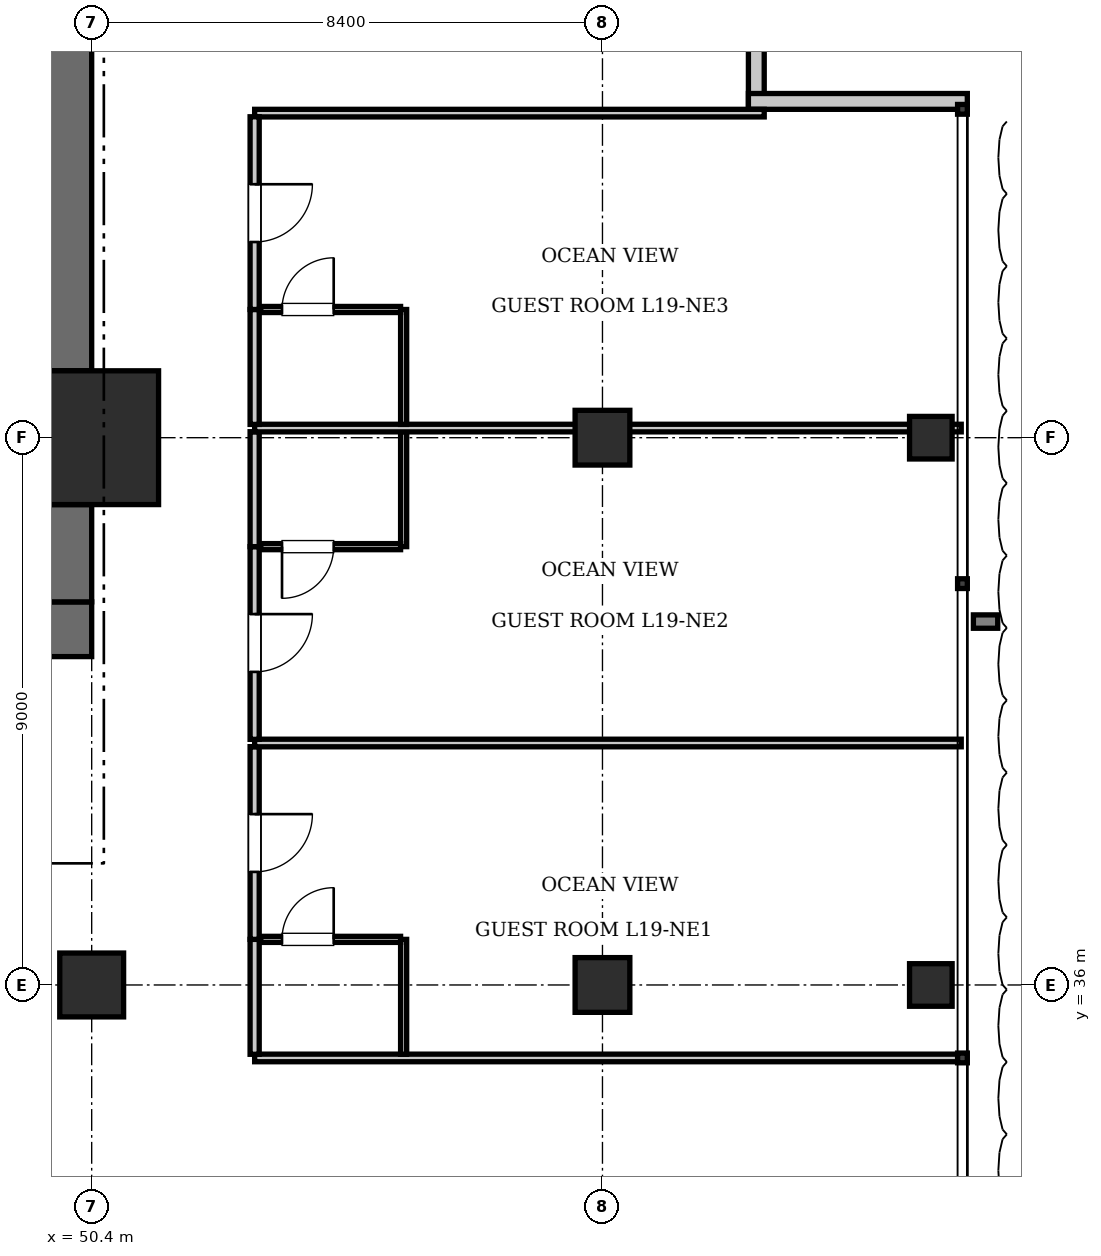
"""IFC4 building model, lengths in metres.
Left out: names, types, materials, properties, quantities, classifications, styles, units other than length and angle.
Written with IfcOpenShell. Run it as: python <this file> out.ifc"""

import sys

from ifc_helpers import new_model, si_unit, direction, frame, frame_2d, origin, origin_2d, place, context, subcontext, project, spatial, rectangle, i_section, extrude, element, fill, save


model = new_model("IFC4")
c1 = context("Model", 3, precision=1e-05, world=origin(), true_north=direction((0.0, 1.0)))
c2 = subcontext(c1, "Body", "Model", "MODEL_VIEW")
j1 = project(units=[si_unit("LENGTHUNIT", "METRE"), si_unit("PLANEANGLEUNIT", "RADIAN")], contexts=[c1])
p1 = place(None, origin())
s1 = spatial("IfcSite", under=j1, at=p1, CompositionType="ELEMENT")
p2 = place(p1, origin())
s2 = spatial("IfcBuilding", under=s1, at=p2, CompositionType="ELEMENT")
p3 = place(p2, frame((0.0, 0.0, 80.85)))
s3 = spatial("IfcBuildingStorey", under=s2, at=p3, CompositionType="ELEMENT", Elevation=80.85)
p4 = place(p3, frame((50.4, 45.0, 0.0), z_axis=(0.0, 0.0, 1.0), x_axis=(1.0, 0.0, 0.0)))
e1 = element("IfcColumn", 1, at=p4, inside=s3, PredefinedType="COLUMN", context=c2, shape_type="SweptSolid", body=[
    extrude(rectangle(XDim=2.2, YDim=2.2, at=origin_2d()), origin(), (0.0, 0.0, 1.0), 3.85),
])
p5 = place(p3, frame((43.6, 41.85, 0.0), z_axis=(0.0, 0.0, 1.0), x_axis=(1.0, 0.0, 0.0)))
e2 = element("IfcWall", 2, at=p5, inside=s3, PredefinedType="SHEAR", context=c2, shape_type="SweptSolid", body=[
    extrude(rectangle(XDim=6.8, YDim=0.9, at=frame_2d((3.4, 0.0))), origin(), (0.0, 0.0, 1.0), 3.85),
])
p6 = place(p5, frame((3.9, 0.0, 0.0)))
e3 = element("IfcOpeningElement", 3, at=p6, cuts=e2, PredefinedType="OPENING", context=c2, shape_type="SweptSolid", body=[
    extrude(rectangle(XDim=1.15, YDim=2.15, at=frame_2d((0.575, 1.075))), frame((0.0, 0.46, 0.0), z_axis=(0.0, -1.0, 0.0), x_axis=(1.0, 0.0, 0.0)), (0.0, 0.0, 1.0), 0.92),
])
p7 = place(p5, frame((0.55, 0.0, 0.0)))
e4 = element("IfcOpeningElement", 4, at=p7, cuts=e2, PredefinedType="OPENING", context=c2, shape_type="SweptSolid", body=[
    extrude(rectangle(XDim=1.1, YDim=2.2, at=frame_2d((0.55, 1.1))), frame((0.0, 0.46, 0.0), z_axis=(0.0, -1.0, 0.0), x_axis=(1.0, 0.0, 0.0)), (0.0, 0.0, 1.0), 0.92),
])
p8 = place(p3, frame((49.95, 42.3, 0.0), z_axis=(0.0, 0.0, 1.0), x_axis=(0.0, 1.0, 0.0)))
e5 = element("IfcWall", 5, at=p8, inside=s3, PredefinedType="SHEAR", context=c2, shape_type="SweptSolid", body=[
    extrude(rectangle(XDim=1.6, YDim=0.9, at=frame_2d((0.8, 0.0))), origin(), (0.0, 0.0, 1.0), 3.85),
])
p9 = place(p3, frame((49.95, 46.1, 0.0), z_axis=(0.0, 0.0, 1.0), x_axis=(0.0, 1.0, 0.0)))
e6 = element("IfcWall", 6, at=p9, inside=s3, PredefinedType="SHEAR", context=c2, shape_type="SweptSolid", body=[
    extrude(rectangle(XDim=7.0, YDim=0.9, at=frame_2d((3.5, 0.0))), origin(), (0.0, 0.0, 1.0), 3.85),
])
p10 = place(p3, frame((50.4, 36.0, 0.0), z_axis=(0.0, 0.0, 1.0), x_axis=(1.0, 0.0, 0.0)))
e7 = element("IfcColumn", 7, at=p10, inside=s3, PredefinedType="COLUMN", context=c2, shape_type="SweptSolid", body=[
    extrude(rectangle(XDim=1.05, YDim=1.05, at=origin_2d()), origin(), (0.0, 0.0, 1.0), 3.85),
])
for number, where, z_axis, x_axis in (
    (8, (58.8, 36.0, 0.0), (0.0, 0.0, 1.0), (1.0, 0.0, 0.0)),
    (9, (58.8, 45.0, 0.0), (0.0, 0.0, 1.0), (1.0, 0.0, 0.0)),
):
    element("IfcColumn", number, at=place(p3, frame(where, z_axis=z_axis, x_axis=x_axis)), inside=s3, PredefinedType="COLUMN", context=c2, shape_type="SweptSolid", body=[
        extrude(rectangle(XDim=0.9, YDim=0.9, at=origin_2d()), origin(), (0.0, 0.0, 1.0), 3.85),
    ])
for number, where, z_axis, x_axis in (
    (10, (64.2, 36.0, 0.0), (0.0, 0.0, 1.0), (1.0, 0.0, 0.0)),
    (11, (64.2, 45.0, 0.0), (0.0, 0.0, 1.0), (1.0, 0.0, 0.0)),
):
    element("IfcColumn", number, at=place(p3, frame(where, z_axis=z_axis, x_axis=x_axis)), inside=s3, PredefinedType="COLUMN", context=c2, shape_type="SweptSolid", body=[
        extrude(i_section(OverallWidth=0.7, OverallDepth=0.7, WebThickness=0.028, FlangeThickness=0.044, at=origin_2d()), origin(), (0.0, 0.0, 1.0), 3.85),
    ])
for number, where, z_axis, x_axis in (
    (12, (61.33, 54.0, 0.0), (0.0, 0.0, 1.0), (0.0, -1.0, 0.0)),
    (13, (61.2, 50.53, 0.0), (0.0, 0.0, 1.0), (1.0, 0.0, 0.0)),
):
    element("IfcWall", number, at=place(p3, frame(where, z_axis=z_axis, x_axis=x_axis)), inside=s3, PredefinedType="SOLIDWALL", context=c2, shape_type="SweptSolid", body=[
        extrude(rectangle(XDim=3.6, YDim=0.26, at=frame_2d((1.8, 0.0))), origin(), (0.0, 0.0, 1.0), 3.61),
    ])
p11 = place(p3, frame((53.08, 34.8, 0.0), z_axis=(0.0, 0.0, 1.0), x_axis=(1.0, 0.0, 0.0)))
e14 = element("IfcWall", 14, at=p11, inside=s3, PredefinedType="PARTITIONING", context=c2, shape_type="SweptSolid", body=[
    extrude(rectangle(XDim=11.62, YDim=0.125, at=frame_2d((5.81, 0.0))), origin(), (0.0, 0.0, 1.0), 3.61),
])
p12 = place(p3, frame((53.08, 50.337, 0.0), z_axis=(0.0, 0.0, 1.0), x_axis=(1.0, 0.0, 0.0)))
e15 = element("IfcWall", 15, at=p12, inside=s3, PredefinedType="PARTITIONING", context=c2, shape_type="SweptSolid", body=[
    extrude(rectangle(XDim=8.38, YDim=0.125, at=frame_2d((4.19, 0.0))), origin(), (0.0, 0.0, 1.0), 3.61),
])
p13 = place(p3, frame((53.08, 34.86, 0.0), z_axis=(0.0, 0.0, 1.0), x_axis=(0.0, 1.0, 0.0)))
e16 = element("IfcWall", 16, at=p13, inside=s3, PredefinedType="PARTITIONING", context=c2, shape_type="SweptSolid", body=[
    extrude(rectangle(XDim=1.89, YDim=0.15, at=frame_2d((0.945, 0.0))), origin(), (0.0, 0.0, 1.0), 3.61),
])
p14 = place(p3, frame((53.08, 36.75, 0.0), z_axis=(0.0, 0.0, 1.0), x_axis=(0.0, 1.0, 0.0)))
e17 = element("IfcWall", 17, at=p14, inside=s3, PredefinedType="PARTITIONING", context=c2, shape_type="SweptSolid", body=[
    extrude(rectangle(XDim=3.169, YDim=0.15, at=frame_2d((1.584, 0.0))), origin(), (0.0, 0.0, 1.0), 3.61),
])
p15 = place(p14, frame((1.11, 0.0, 0.0)))
e18 = element("IfcOpeningElement", 18, at=p15, cuts=e17, PredefinedType="OPENING", context=c2, shape_type="SweptSolid", body=[
    extrude(rectangle(XDim=0.95, YDim=2.15, at=frame_2d((0.475, 1.075))), frame((0.0, 0.085, 0.0), z_axis=(0.0, -1.0, 0.0), x_axis=(1.0, 0.0, 0.0)), (0.0, 0.0, 1.0), 0.17),
])
p16 = place(p3, frame((55.53, 34.86, 0.0), z_axis=(0.0, 0.0, 1.0), x_axis=(0.0, 1.0, 0.0)))
e19 = element("IfcWall", 19, at=p16, inside=s3, PredefinedType="PARTITIONING", context=c2, shape_type="SweptSolid", body=[
    extrude(rectangle(XDim=1.89, YDim=0.1, at=frame_2d((0.945, 0.0))), origin(), (0.0, 0.0, 1.0), 3.61),
])
p17 = place(p3, frame((53.18, 36.75, 0.0), z_axis=(0.0, 0.0, 1.0), x_axis=(1.0, 0.0, 0.0)))
e20 = element("IfcWall", 20, at=p17, inside=s3, PredefinedType="PARTITIONING", context=c2, shape_type="SweptSolid", body=[
    extrude(rectangle(XDim=2.3, YDim=0.1, at=frame_2d((1.15, 0.0))), origin(), (0.0, 0.0, 1.0), 3.61),
])
p18 = place(p17, frame((0.35, 0.0, 0.0)))
e21 = element("IfcOpeningElement", 21, at=p18, cuts=e20, PredefinedType="OPENING", context=c2, shape_type="SweptSolid", body=[
    extrude(rectangle(XDim=0.85, YDim=2.1, at=frame_2d((0.425, 1.05))), frame((0.0, 0.06, 0.0), z_axis=(0.0, -1.0, 0.0), x_axis=(1.0, 0.0, 0.0)), (0.0, 0.0, 1.0), 0.12),
])
p19 = place(p3, frame((53.08, 39.979, 0.0), z_axis=(0.0, 0.0, 1.0), x_axis=(1.0, 0.0, 0.0)))
e22 = element("IfcWall", 22, at=p19, inside=s3, PredefinedType="PARTITIONING", context=c2, shape_type="SweptSolid", body=[
    extrude(rectangle(XDim=11.62, YDim=0.125, at=frame_2d((5.81, 0.0))), origin(), (0.0, 0.0, 1.0), 3.61),
])
p20 = place(p3, frame((53.08, 40.039, 0.0), z_axis=(0.0, 0.0, 1.0), x_axis=(0.0, 1.0, 0.0)))
e23 = element("IfcWall", 23, at=p20, inside=s3, PredefinedType="PARTITIONING", context=c2, shape_type="SweptSolid", body=[
    extrude(rectangle(XDim=3.169, YDim=0.15, at=frame_2d((1.584, 0.0))), origin(), (0.0, 0.0, 1.0), 3.61),
])
p21 = place(p20, frame((1.11, 0.0, 0.0)))
e24 = element("IfcOpeningElement", 24, at=p21, cuts=e23, PredefinedType="OPENING", context=c2, shape_type="SweptSolid", body=[
    extrude(rectangle(XDim=0.95, YDim=2.15, at=frame_2d((0.475, 1.075))), frame((0.0, 0.085, 0.0), z_axis=(0.0, -1.0, 0.0), x_axis=(1.0, 0.0, 0.0)), (0.0, 0.0, 1.0), 0.17),
])
p22 = place(p3, frame((53.08, 43.208, 0.0), z_axis=(0.0, 0.0, 1.0), x_axis=(0.0, 1.0, 0.0)))
e25 = element("IfcWall", 25, at=p22, inside=s3, PredefinedType="PARTITIONING", context=c2, shape_type="SweptSolid", body=[
    extrude(rectangle(XDim=1.89, YDim=0.15, at=frame_2d((0.945, 0.0))), origin(), (0.0, 0.0, 1.0), 3.61),
])
p23 = place(p3, frame((55.53, 43.208, 0.0), z_axis=(0.0, 0.0, 1.0), x_axis=(0.0, 1.0, 0.0)))
e26 = element("IfcWall", 26, at=p23, inside=s3, PredefinedType="PARTITIONING", context=c2, shape_type="SweptSolid", body=[
    extrude(rectangle(XDim=1.89, YDim=0.1, at=frame_2d((0.945, 0.0))), origin(), (0.0, 0.0, 1.0), 3.61),
])
p24 = place(p3, frame((53.18, 43.208, 0.0), z_axis=(0.0, 0.0, 1.0), x_axis=(1.0, 0.0, 0.0)))
e27 = element("IfcWall", 27, at=p24, inside=s3, PredefinedType="PARTITIONING", context=c2, shape_type="SweptSolid", body=[
    extrude(rectangle(XDim=2.3, YDim=0.1, at=frame_2d((1.15, 0.0))), origin(), (0.0, 0.0, 1.0), 3.61),
])
p25 = place(p24, frame((0.35, 0.0, 0.0)))
e28 = element("IfcOpeningElement", 28, at=p25, cuts=e27, PredefinedType="OPENING", context=c2, shape_type="SweptSolid", body=[
    extrude(rectangle(XDim=0.85, YDim=2.1, at=frame_2d((0.425, 1.05))), frame((0.0, 0.06, 0.0), z_axis=(0.0, -1.0, 0.0), x_axis=(1.0, 0.0, 0.0)), (0.0, 0.0, 1.0), 0.12),
])
p26 = place(p3, frame((53.08, 45.158, 0.0), z_axis=(0.0, 0.0, 1.0), x_axis=(1.0, 0.0, 0.0)))
e29 = element("IfcWall", 29, at=p26, inside=s3, PredefinedType="PARTITIONING", context=c2, shape_type="SweptSolid", body=[
    extrude(rectangle(XDim=11.62, YDim=0.125, at=frame_2d((5.81, 0.0))), origin(), (0.0, 0.0, 1.0), 2.999),
])
p27 = place(p3, frame((53.08, 45.218, 0.0), z_axis=(0.0, 0.0, 1.0), x_axis=(0.0, 1.0, 0.0)))
e30 = element("IfcWall", 30, at=p27, inside=s3, PredefinedType="PARTITIONING", context=c2, shape_type="SweptSolid", body=[
    extrude(rectangle(XDim=1.89, YDim=0.15, at=frame_2d((0.945, 0.0))), origin(), (0.0, 0.0, 1.0), 3.61),
])
p28 = place(p3, frame((53.08, 47.108, 0.0), z_axis=(0.0, 0.0, 1.0), x_axis=(0.0, 1.0, 0.0)))
e31 = element("IfcWall", 31, at=p28, inside=s3, PredefinedType="PARTITIONING", context=c2, shape_type="SweptSolid", body=[
    extrude(rectangle(XDim=3.169, YDim=0.15, at=frame_2d((1.584, 0.0))), origin(), (0.0, 0.0, 1.0), 3.61),
])
p29 = place(p28, frame((1.11, 0.0, 0.0)))
e32 = element("IfcOpeningElement", 32, at=p29, cuts=e31, PredefinedType="OPENING", context=c2, shape_type="SweptSolid", body=[
    extrude(rectangle(XDim=0.95, YDim=2.15, at=frame_2d((0.475, 1.075))), frame((0.0, 0.085, 0.0), z_axis=(0.0, -1.0, 0.0), x_axis=(1.0, 0.0, 0.0)), (0.0, 0.0, 1.0), 0.17),
])
p30 = place(p3, frame((55.53, 45.218, 0.0), z_axis=(0.0, 0.0, 1.0), x_axis=(0.0, 1.0, 0.0)))
e33 = element("IfcWall", 33, at=p30, inside=s3, PredefinedType="PARTITIONING", context=c2, shape_type="SweptSolid", body=[
    extrude(rectangle(XDim=1.89, YDim=0.1, at=frame_2d((0.945, 0.0))), origin(), (0.0, 0.0, 1.0), 3.61),
])
p31 = place(p3, frame((53.18, 47.108, 0.0), z_axis=(0.0, 0.0, 1.0), x_axis=(1.0, 0.0, 0.0)))
e34 = element("IfcWall", 34, at=p31, inside=s3, PredefinedType="PARTITIONING", context=c2, shape_type="SweptSolid", body=[
    extrude(rectangle(XDim=2.3, YDim=0.1, at=frame_2d((1.15, 0.0))), origin(), (0.0, 0.0, 1.0), 3.61),
])
p32 = place(p31, frame((0.35, 0.0, 0.0)))
e35 = element("IfcOpeningElement", 35, at=p32, cuts=e34, PredefinedType="OPENING", context=c2, shape_type="SweptSolid", body=[
    extrude(rectangle(XDim=0.85, YDim=2.1, at=frame_2d((0.425, 1.05))), frame((0.0, 0.06, 0.0), z_axis=(0.0, -1.0, 0.0), x_axis=(1.0, 0.0, 0.0)), (0.0, 0.0, 1.0), 0.12),
])
p33 = place(p18, origin())
e36 = element("IfcDoor", 36, at=p33, inside=s3, OperationType="SINGLE_SWING_RIGHT", PredefinedType="DOOR", context=c2, shape_type="SweptSolid", body=[
    extrude(rectangle(XDim=0.85, YDim=2.1, at=frame_2d((0.425, 1.05))), frame((0.0, 0.025, 0.0), z_axis=(0.0, -1.0, 0.0), x_axis=(1.0, 0.0, 0.0)), (0.0, 0.0, 1.0), 0.05),
])
fill(e21, e36)
p34 = place(p15, frame((0.95, 0.0, 0.0), z_axis=(0.0, 0.0, 1.0), x_axis=(-1.0, 0.0, 0.0)))
e37 = element("IfcDoor", 37, at=p34, inside=s3, OperationType="SINGLE_SWING_LEFT", PredefinedType="DOOR", context=c2, shape_type="SweptSolid", body=[
    extrude(rectangle(XDim=0.95, YDim=2.15, at=frame_2d((0.475, 1.075))), frame((0.0, 0.025, 0.0), z_axis=(0.0, -1.0, 0.0), x_axis=(1.0, 0.0, 0.0)), (0.0, 0.0, 1.0), 0.05),
])
fill(e18, e37)
p35 = place(p25, frame((0.85, 0.0, 0.0), z_axis=(0.0, 0.0, 1.0), x_axis=(-1.0, 0.0, 0.0)))
e38 = element("IfcDoor", 38, at=p35, inside=s3, OperationType="SINGLE_SWING_RIGHT", PredefinedType="DOOR", context=c2, shape_type="SweptSolid", body=[
    extrude(rectangle(XDim=0.85, YDim=2.1, at=frame_2d((0.425, 1.05))), frame((0.0, 0.025, 0.0), z_axis=(0.0, -1.0, 0.0), x_axis=(1.0, 0.0, 0.0)), (0.0, 0.0, 1.0), 0.05),
])
fill(e28, e38)
p36 = place(p21, frame((0.95, 0.0, 0.0), z_axis=(0.0, 0.0, 1.0), x_axis=(-1.0, 0.0, 0.0)))
e39 = element("IfcDoor", 39, at=p36, inside=s3, OperationType="SINGLE_SWING_LEFT", PredefinedType="DOOR", context=c2, shape_type="SweptSolid", body=[
    extrude(rectangle(XDim=0.95, YDim=2.15, at=frame_2d((0.475, 1.075))), frame((0.0, 0.025, 0.0), z_axis=(0.0, -1.0, 0.0), x_axis=(1.0, 0.0, 0.0)), (0.0, 0.0, 1.0), 0.05),
])
fill(e24, e39)
p37 = place(p32, origin())
e40 = element("IfcDoor", 40, at=p37, inside=s3, OperationType="SINGLE_SWING_RIGHT", PredefinedType="DOOR", context=c2, shape_type="SweptSolid", body=[
    extrude(rectangle(XDim=0.85, YDim=2.1, at=frame_2d((0.425, 1.05))), frame((0.0, 0.025, 0.0), z_axis=(0.0, -1.0, 0.0), x_axis=(1.0, 0.0, 0.0)), (0.0, 0.0, 1.0), 0.05),
])
fill(e35, e40)
p38 = place(p29, frame((0.95, 0.0, 0.0), z_axis=(0.0, 0.0, 1.0), x_axis=(-1.0, 0.0, 0.0)))
e41 = element("IfcDoor", 41, at=p38, inside=s3, OperationType="SINGLE_SWING_LEFT", PredefinedType="DOOR", context=c2, shape_type="SweptSolid", body=[
    extrude(rectangle(XDim=0.95, YDim=2.15, at=frame_2d((0.475, 1.075))), frame((0.0, 0.025, 0.0), z_axis=(0.0, -1.0, 0.0), x_axis=(1.0, 0.0, 0.0)), (0.0, 0.0, 1.0), 0.05),
])
fill(e32, e41)
save(model, sys.argv[1])
